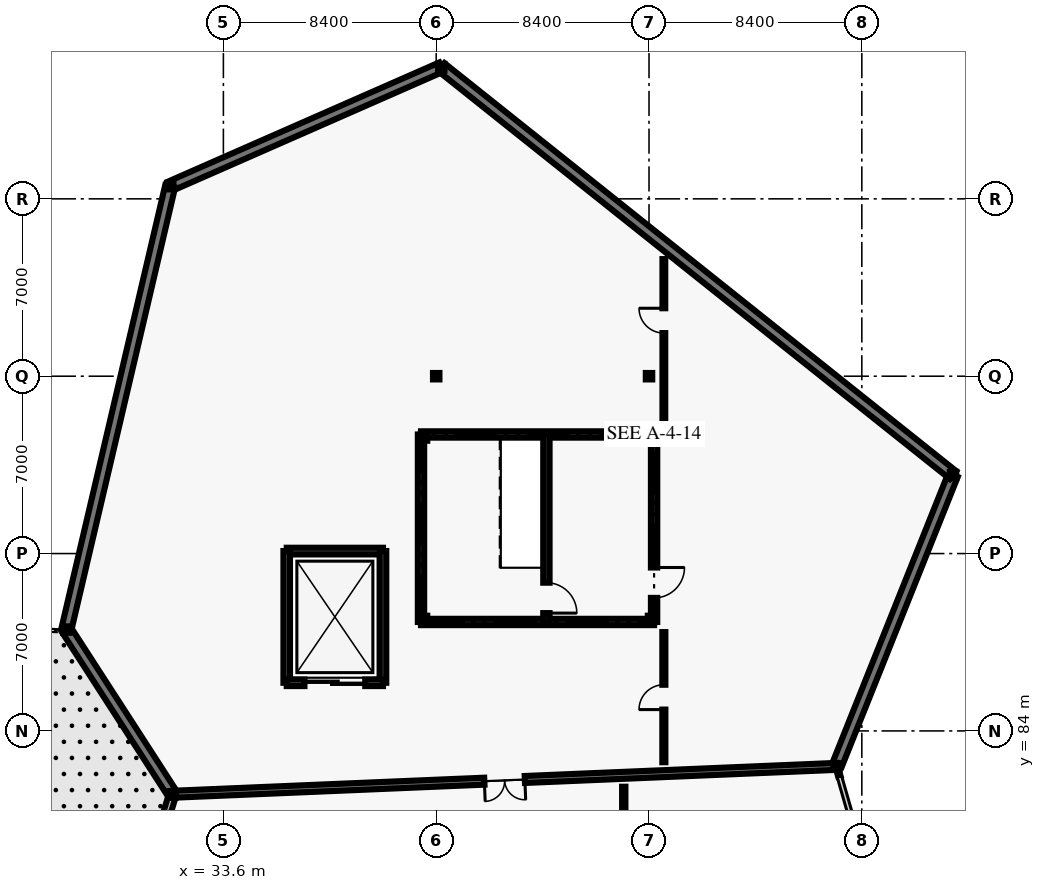
"""IFC4 building model, lengths in metres.
Left out: names, types, materials, properties, quantities, classifications, styles, units other than length and angle.
Written with IfcOpenShell. Run it as: python <this file> out.ifc"""

import sys

from ifc_helpers import new_model, si_unit, direction, frame, frame_2d, origin, origin_2d, place, context, subcontext, project, spatial, rectangle, i_section, extrude, element, fill, save


model = new_model("IFC4")
c1 = context("Model", 3, precision=1e-05, world=origin(), true_north=direction((0.0, 1.0)))
c2 = subcontext(c1, "Body", "Model", "MODEL_VIEW")
j1 = project(units=[si_unit("LENGTHUNIT", "METRE"), si_unit("PLANEANGLEUNIT", "RADIAN")], contexts=[c1])
p1 = place(None, origin())
s1 = spatial("IfcSite", under=j1, at=p1, CompositionType="ELEMENT")
p2 = place(p1, origin())
s2 = spatial("IfcBuilding", under=s1, at=p2, CompositionType="ELEMENT")
p3 = place(p2, frame((0.0, 0.0, 15.0)))
s3 = spatial("IfcBuildingStorey", under=s2, at=p3, CompositionType="ELEMENT", Elevation=15.0)
for number, where, z_axis, x_axis in (
    (1, (27.4, 88.0, 0.0), (0.0, 0.0, 1.0), (1.0, 0.0, 0.0)),
    (2, (31.5, 105.5, 0.0), (0.0, 0.0, 1.0), (1.0, 0.0, 0.0)),
    (3, (31.6, 81.5, 0.0), (0.0, 0.0, 1.0), (1.0, 0.0, 0.0)),
    (4, (42.2, 110.2, 0.0), (0.0, 0.0, 1.0), (1.0, 0.0, 0.0)),
    (5, (57.8, 82.6, 0.0), (0.0, 0.0, 1.0), (1.0, 0.0, 0.0)),
    (6, (62.4, 94.1, 0.0), (0.0, 0.0, 1.0), (1.0, 0.0, 0.0)),
    (7, (42.0, 98.0, 0.0), (0.0, 0.0, 1.0), (1.0, 0.0, 0.0)),
    (8, (50.4, 98.0, 0.0), (0.0, 0.0, 1.0), (1.0, 0.0, 0.0)),
    (9, (41.52, 88.42, 0.0), (0.0, 0.0, 1.0), (1.0, 0.0, 0.0)),
    (10, (50.48, 88.42, 0.0), (0.0, 0.0, 1.0), (1.0, 0.0, 0.0)),
    (11, (50.48, 95.58, 0.0), (0.0, 0.0, 1.0), (1.0, 0.0, 0.0)),
    (12, (41.52, 95.58, 0.0), (0.0, 0.0, 1.0), (1.0, 0.0, 0.0)),
):
    element("IfcColumn", number, at=place(p3, frame(where, z_axis=z_axis, x_axis=x_axis)), inside=s3, PredefinedType="COLUMN", context=c2, shape_type="SweptSolid", body=[
        extrude(i_section(OverallWidth=0.254, OverallDepth=0.254, WebThickness=0.009, FlangeThickness=0.014, FilletRadius=0.013, at=origin_2d()), origin(), (0.0, 0.0, 1.0), 4.8),
    ])
p4 = place(p3, frame((57.829, 82.502, 0.0), z_axis=(0.0, 0.0, 1.0), x_axis=(0.275977786159, -0.961164013864, 0.0)))
e13 = element("IfcWall", 13, at=p4, inside=s3, PredefinedType="SOLIDWALL", context=c2, shape_type="SweptSolid", body=[
    extrude(rectangle(XDim=0.308, YDim=0.095, at=frame_2d((0.154, 0.0))), origin(), (0.0, 0.0, 1.0), 3.62),
])
p5 = place(p3, frame((26.3, 64.3, 0.0), z_axis=(0.0, 0.0, 1.0), x_axis=(0.294452119874, 0.955666233108, 0.0)))
e14 = element("IfcWall", 14, at=p5, inside=s3, PredefinedType="SOLIDWALL", context=c2, shape_type="SweptSolid", body=[
    extrude(rectangle(XDim=17.938, YDim=0.29, at=frame_2d((8.969, 0.0))), origin(), (0.0, 0.0, 1.0), 3.62),
])
p6 = place(p5, frame((7.994, 0.0, 0.0)))
e15 = element("IfcOpeningElement", 15, at=p6, cuts=e14, PredefinedType="OPENING", context=c2, shape_type="SweptSolid", body=[
    extrude(rectangle(XDim=1.95, YDim=2.3, at=frame_2d((0.975, 1.15))), frame((0.0, 0.155, 0.0), z_axis=(0.0, -1.0, 0.0), x_axis=(1.0, 0.0, 0.0)), (0.0, 0.0, 1.0), 0.31),
])
p7 = place(p3, frame((62.4, 94.1, 0.0), z_axis=(0.0, 0.0, 1.0), x_axis=(-0.371407751599, -0.928469860605, 0.0)))
e16 = element("IfcWall", 16, at=p7, inside=s3, PredefinedType="SOLIDWALL", context=c2, shape_type="SweptSolid", body=[
    extrude(rectangle(XDim=12.326, YDim=0.4, at=frame_2d((6.163, 0.0))), origin(), (0.0, 0.0, 1.0), 3.62),
])
p8 = place(p3, frame((42.2, 110.2, 0.0), z_axis=(0.0, 0.0, 1.0), x_axis=(0.78200261515, -0.623275147827, 0.0)))
e17 = element("IfcWall", 17, at=p8, inside=s3, PredefinedType="SOLIDWALL", context=c2, shape_type="SweptSolid", body=[
    extrude(rectangle(XDim=25.831, YDim=0.4, at=frame_2d((12.916, 0.0))), origin(), (0.0, 0.0, 1.0), 3.62),
])
p9 = place(p3, frame((31.5, 105.5, 0.0), z_axis=(0.0, 0.0, 1.0), x_axis=(0.915568057854, 0.40216306573, 0.0)))
e18 = element("IfcWall", 18, at=p9, inside=s3, PredefinedType="SOLIDWALL", context=c2, shape_type="SweptSolid", body=[
    extrude(rectangle(XDim=11.687, YDim=0.4, at=frame_2d((5.843, 0.0))), origin(), (0.0, 0.0, 1.0), 3.62),
])
p10 = place(p3, frame((27.4, 88.0, 0.0), z_axis=(0.0, 0.0, 1.0), x_axis=(0.228114067381, 0.973634414071, 0.0)))
e19 = element("IfcWall", 19, at=p10, inside=s3, PredefinedType="SOLIDWALL", context=c2, shape_type="SweptSolid", body=[
    extrude(rectangle(XDim=17.974, YDim=0.4, at=frame_2d((8.987, 0.0))), origin(), (0.0, 0.0, 1.0), 3.62),
])
p11 = place(p3, frame((31.567, 81.55, 0.0), z_axis=(0.0, 0.0, 1.0), x_axis=(-0.542653962992, 0.839956353895, 0.0)))
e20 = element("IfcWall", 20, at=p11, inside=s3, PredefinedType="SOLIDWALL", context=c2, shape_type="SweptSolid", body=[
    extrude(rectangle(XDim=7.679, YDim=0.4, at=frame_2d((3.839, 0.0))), origin(), (0.0, 0.0, 1.0), 3.62),
])
p12 = place(p3, frame((57.8, 82.6, 0.0), z_axis=(0.0, 0.0, 1.0), x_axis=(-0.999119645224, -0.041951573605, 0.0)))
e21 = element("IfcWall", 21, at=p12, inside=s3, PredefinedType="SOLIDWALL", context=c2, shape_type="SweptSolid", body=[
    extrude(rectangle(XDim=26.223, YDim=0.275, at=frame_2d((13.112, 0.0))), origin(), (0.0, 0.0, 1.0), 4.02),
])
p13 = place(p12, frame((12.312, 0.0, 0.0)))
e22 = element("IfcOpeningElement", 22, at=p13, cuts=e21, PredefinedType="OPENING", context=c2, shape_type="SweptSolid", body=[
    extrude(rectangle(XDim=1.6, YDim=2.45, at=frame_2d((0.8, 1.225))), frame((0.0, 0.147, 0.0), z_axis=(0.0, -1.0, 0.0), x_axis=(1.0, 0.0, 0.0)), (0.0, 0.0, 1.0), 0.295),
])
p14 = place(p3, frame((49.403, 57.267, 0.0), z_axis=(0.0, 0.0, 1.0), x_axis=(0.0, 1.0, 0.0)))
e23 = element("IfcWall", 23, at=p14, inside=s3, PredefinedType="PARTITIONING", context=c2, shape_type="SweptSolid", body=[
    extrude(rectangle(XDim=24.53, YDim=0.13, at=frame_2d((12.265, 0.0))), origin(), (0.0, 0.0, 1.0), 3.32),
])
p15 = place(p14, frame((11.79, 0.0, 0.0)))
e24 = element("IfcOpeningElement", 24, at=p15, cuts=e23, PredefinedType="OPENING", context=c2, shape_type="SweptSolid", body=[
    extrude(rectangle(XDim=0.95, YDim=2.15, at=frame_2d((0.475, 1.075))), frame((0.0, 0.075, 0.0), z_axis=(0.0, -1.0, 0.0), x_axis=(1.0, 0.0, 0.0)), (0.0, 0.0, 1.0), 0.15),
])
p16 = place(p3, frame((50.986, 82.764, 0.0), z_axis=(0.0, 0.0, 1.0), x_axis=(0.0, 1.0, 0.0)))
e25 = element("IfcWall", 25, at=p16, inside=s3, PredefinedType="PARTITIONING", context=c2, shape_type="SweptSolid", body=[
    extrude(rectangle(XDim=5.136, YDim=0.12, at=frame_2d((2.568, 0.0))), origin(), (0.0, 0.0, 1.0), 3.32),
])
p17 = place(p16, frame((2.078, 0.0, 0.0)))
e26 = element("IfcOpeningElement", 26, at=p17, cuts=e25, PredefinedType="OPENING", context=c2, shape_type="SweptSolid", body=[
    extrude(rectangle(XDim=0.98, YDim=2.15, at=frame_2d((0.49, 1.075))), frame((0.0, 0.07, 0.0), z_axis=(0.0, -1.0, 0.0), x_axis=(1.0, 0.0, 0.0)), (0.0, 0.0, 1.0), 0.14),
])
p18 = place(p3, frame((50.986, 96.1, 0.0), z_axis=(0.0, 0.0, 1.0), x_axis=(0.0, 1.0, 0.0)))
e27 = element("IfcWall", 27, at=p18, inside=s3, PredefinedType="PARTITIONING", context=c2, shape_type="SweptSolid", body=[
    extrude(rectangle(XDim=6.522, YDim=0.11, at=frame_2d((3.261, 0.0))), origin(), (0.0, 0.0, 1.0), 3.32),
])
p19 = place(p18, frame((3.602, 0.0, 0.0)))
e28 = element("IfcOpeningElement", 28, at=p19, cuts=e27, PredefinedType="OPENING", context=c2, shape_type="SweptSolid", body=[
    extrude(rectangle(XDim=0.98, YDim=2.15, at=frame_2d((0.49, 1.075))), frame((0.0, 0.065, 0.0), z_axis=(0.0, -1.0, 0.0), x_axis=(1.0, 0.0, 0.0)), (0.0, 0.0, 1.0), 0.13),
])
p20 = place(p3, frame((41.4, 88.3, 0.0), z_axis=(0.0, 0.0, 1.0), x_axis=(0.0, 1.0, 0.0)))
e29 = element("IfcWall", 29, at=p20, inside=s3, PredefinedType="SHEAR", context=c2, shape_type="SweptSolid", body=[
    extrude(rectangle(XDim=7.4, YDim=0.25, at=frame_2d((3.7, 0.0))), origin(), (0.0, 0.0, 1.0), 4.56),
])
for number, where, z_axis, x_axis in (
    (30, (41.4, 95.7, 0.0), (0.0, 0.0, 1.0), (1.0, 0.0, 0.0)),
    (31, (50.6, 88.3, 0.0), (0.0, 0.0, 1.0), (-1.0, 0.0, 0.0)),
):
    element("IfcWall", number, at=place(p3, frame(where, z_axis=z_axis, x_axis=x_axis)), inside=s3, PredefinedType="SHEAR", context=c2, shape_type="SweptSolid", body=[
        extrude(rectangle(XDim=9.2, YDim=0.25, at=frame_2d((4.6, 0.0))), origin(), (0.0, 0.0, 1.0), 4.56),
    ])
p21 = place(p3, frame((50.6, 95.7, 0.0), z_axis=(0.0, 0.0, 1.0), x_axis=(0.0, -1.0, 0.0)))
e32 = element("IfcWall", 32, at=p21, inside=s3, PredefinedType="SHEAR", context=c2, shape_type="SweptSolid", body=[
    extrude(rectangle(XDim=7.4, YDim=0.25, at=frame_2d((3.7, 0.0))), origin(), (0.0, 0.0, 1.0), 4.56),
])
p22 = place(p21, frame((5.25, 0.0, 0.0)))
e33 = element("IfcOpeningElement", 33, at=p22, cuts=e32, PredefinedType="OPENING", context=c2, shape_type="SweptSolid", body=[
    extrude(rectangle(XDim=1.2, YDim=2.2, at=frame_2d((0.6, 1.1))), frame((0.0, 0.135, 0.0), z_axis=(0.0, -1.0, 0.0), x_axis=(1.0, 0.0, 0.0)), (0.0, 0.0, 1.0), 0.27),
])
p23 = place(p3, frame((46.35, 95.7, 0.0), z_axis=(0.0, 0.0, 1.0), x_axis=(0.0, -1.0, 0.0)))
e34 = element("IfcWall", 34, at=p23, inside=s3, PredefinedType="SHEAR", context=c2, shape_type="SweptSolid", body=[
    extrude(rectangle(XDim=7.4, YDim=0.25, at=frame_2d((3.7, 0.0))), origin(), (0.0, 0.0, 1.0), 4.56),
])
p24 = place(p23, frame((5.85, 0.0, 0.0)))
e35 = element("IfcOpeningElement", 35, at=p24, cuts=e34, PredefinedType="OPENING", context=c2, shape_type="SweptSolid", body=[
    extrude(rectangle(XDim=1.2, YDim=2.2, at=frame_2d((0.6, 1.1))), frame((0.0, 0.135, 0.0), z_axis=(0.0, -1.0, 0.0), x_axis=(1.0, 0.0, 0.0)), (0.0, 0.0, 1.0), 0.27),
])
p25 = place(p3, frame((36.1, 91.1, 0.0), z_axis=(0.0, 0.0, 1.0), x_axis=(1.0, 0.0, 0.0)))
e36 = element("IfcWall", 36, at=p25, inside=s3, PredefinedType="SHEAR", context=c2, shape_type="SweptSolid", body=[
    extrude(rectangle(XDim=3.8, YDim=0.26, at=frame_2d((1.9, 0.0))), origin(), (0.0, 0.0, 1.0), 5.9),
])
for number, where, z_axis, x_axis in (
    (37, (39.9, 91.1, 0.0), (0.0, 0.0, 1.0), (0.0, -1.0, 0.0)),
    (38, (36.1, 85.9, 0.0), (0.0, 0.0, 1.0), (0.0, 1.0, 0.0)),
):
    element("IfcWall", number, at=place(p3, frame(where, z_axis=z_axis, x_axis=x_axis)), inside=s3, PredefinedType="SHEAR", context=c2, shape_type="SweptSolid", body=[
        extrude(rectangle(XDim=5.2, YDim=0.26, at=frame_2d((2.6, 0.0))), origin(), (0.0, 0.0, 1.0), 5.9),
    ])
p26 = place(p3, frame((39.9, 85.9, 0.0), z_axis=(0.0, 0.0, 1.0), x_axis=(-1.0, 0.0, 0.0)))
e39 = element("IfcWall", 39, at=p26, inside=s3, PredefinedType="SHEAR", context=c2, shape_type="SweptSolid", body=[
    extrude(rectangle(XDim=3.8, YDim=0.26, at=frame_2d((1.9, 0.0))), origin(), (0.0, 0.0, 1.0), 5.9),
])
p27 = place(p26, frame((0.7, 0.0, 0.0)))
e40 = element("IfcOpeningElement", 40, at=p27, cuts=e39, PredefinedType="OPENING", context=c2, shape_type="SweptSolid", body=[
    extrude(rectangle(XDim=2.4, YDim=2.85, at=frame_2d((1.2, 1.425))), frame((0.0, 0.14, 0.0), z_axis=(0.0, -1.0, 0.0), x_axis=(1.0, 0.0, 0.0)), (0.0, 0.0, 1.0), 0.28),
])
p28 = place(p13, origin())
e41 = element("IfcDoor", 41, at=p28, inside=s3, OperationType="DOUBLE_DOOR_SINGLE_SWING", PredefinedType="DOOR", context=c2, shape_type="SweptSolid", body=[
    extrude(rectangle(XDim=1.6, YDim=2.45, at=frame_2d((0.8, 1.225))), frame((0.0, 0.025, 0.0), z_axis=(0.0, -1.0, 0.0), x_axis=(1.0, 0.0, 0.0)), (0.0, 0.0, 1.0), 0.05),
])
fill(e22, e41)
p29 = place(p17, origin())
e42 = element("IfcDoor", 42, at=p29, inside=s3, OperationType="SINGLE_SWING_LEFT", PredefinedType="DOOR", context=c2, shape_type="SweptSolid", body=[
    extrude(rectangle(XDim=0.98, YDim=2.15, at=frame_2d((0.49, 1.075))), frame((0.0, 0.025, 0.0), z_axis=(0.0, -1.0, 0.0), x_axis=(1.0, 0.0, 0.0)), (0.0, 0.0, 1.0), 0.05),
])
fill(e26, e42)
p30 = place(p19, origin())
e43 = element("IfcDoor", 43, at=p30, inside=s3, OperationType="SINGLE_SWING_RIGHT", PredefinedType="DOOR", context=c2, shape_type="SweptSolid", body=[
    extrude(rectangle(XDim=0.98, YDim=2.15, at=frame_2d((0.49, 1.075))), frame((0.0, 0.025, 0.0), z_axis=(0.0, -1.0, 0.0), x_axis=(1.0, 0.0, 0.0)), (0.0, 0.0, 1.0), 0.05),
])
fill(e28, e43)
p31 = place(p22, origin())
e44 = element("IfcDoor", 44, at=p31, inside=s3, OperationType="SINGLE_SWING_LEFT", PredefinedType="DOOR", context=c2, shape_type="SweptSolid", body=[
    extrude(rectangle(XDim=1.2, YDim=2.2, at=frame_2d((0.6, 1.1))), frame((0.0, 0.025, 0.0), z_axis=(0.0, -1.0, 0.0), x_axis=(1.0, 0.0, 0.0)), (0.0, 0.0, 1.0), 0.05),
])
fill(e33, e44)
p32 = place(p24, origin())
e45 = element("IfcDoor", 45, at=p32, inside=s3, OperationType="SINGLE_SWING_RIGHT", PredefinedType="DOOR", context=c2, shape_type="SweptSolid", body=[
    extrude(rectangle(XDim=1.2, YDim=2.2, at=frame_2d((0.6, 1.1))), frame((0.0, 0.025, 0.0), z_axis=(0.0, -1.0, 0.0), x_axis=(1.0, 0.0, 0.0)), (0.0, 0.0, 1.0), 0.05),
])
fill(e35, e45)
p33 = place(p27, origin())
e46 = element("IfcDoor", 46, at=p33, inside=s3, OperationType="SLIDING_TO_LEFT", PredefinedType="DOOR", context=c2, shape_type="SweptSolid", body=[
    extrude(rectangle(XDim=2.4, YDim=2.85, at=frame_2d((1.2, 1.425))), frame((0.0, 0.025, 0.0), z_axis=(0.0, -1.0, 0.0), x_axis=(1.0, 0.0, 0.0)), (0.0, 0.0, 1.0), 0.05),
])
fill(e40, e46)
save(model, sys.argv[1])
